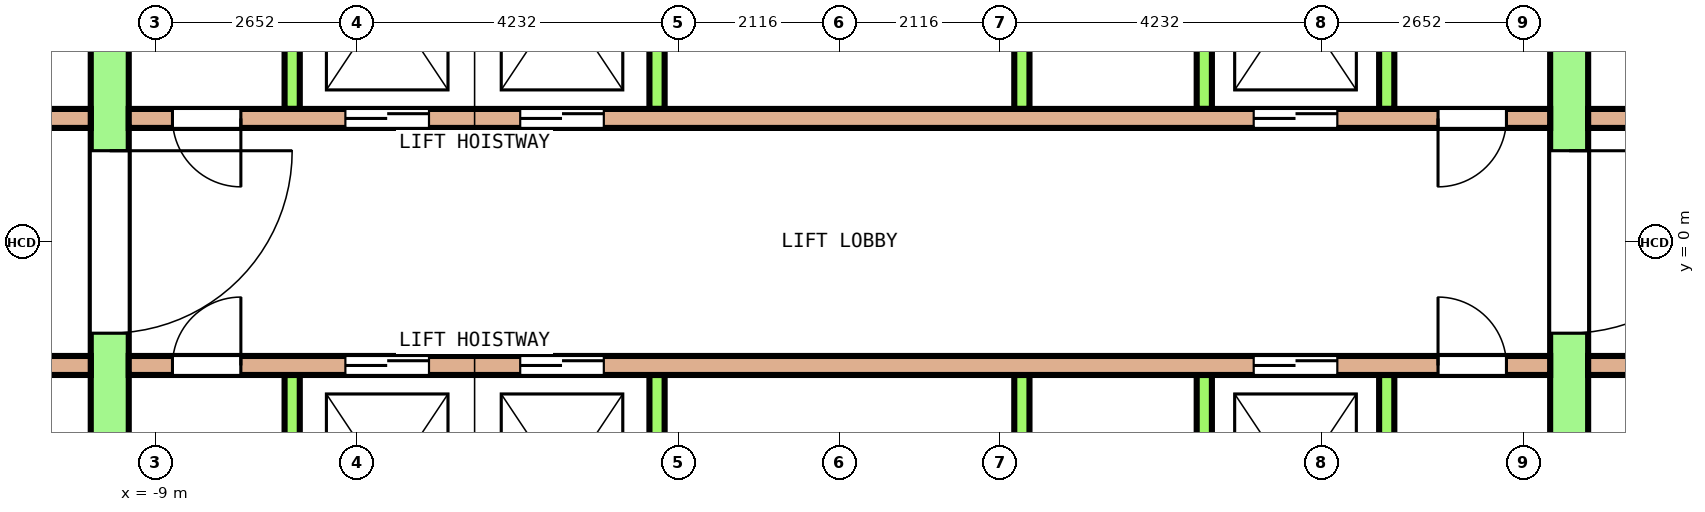
"""IFC4 building model, lengths in metres.
Left out: names, types, materials, properties, quantities, classifications, styles, units other than length and angle.
Written with IfcOpenShell. Run it as: python <this file> out.ifc"""

import sys

from ifc_helpers import new_model, si_unit, direction, frame, frame_2d, origin, place, context, subcontext, project, spatial, rectangle, extrude, element, fill, save


model = new_model("IFC4")
c1 = context("Model", 3, precision=1e-05, world=origin(), true_north=direction((0.0, 1.0)))
c2 = subcontext(c1, "Body", "Model", "MODEL_VIEW")
j1 = project(units=[si_unit("LENGTHUNIT", "METRE"), si_unit("PLANEANGLEUNIT", "RADIAN")], contexts=[c1])
p1 = place(None, origin())
s1 = spatial("IfcSite", under=j1, at=p1, CompositionType="ELEMENT")
p2 = place(p1, origin())
s2 = spatial("IfcBuilding", under=s1, at=p2, CompositionType="ELEMENT")
p3 = place(p2, frame((0.0, 0.0, 180.4)))
s3 = spatial("IfcBuildingStorey", under=s2, at=p3, CompositionType="ELEMENT", Elevation=180.4)
p4 = place(p3, frame((-9.6, -7.75, 0.0), z_axis=(0.0, 0.0, 1.0), x_axis=(0.0, 1.0, 0.0)))
e1 = element("IfcWall", 1, at=p4, inside=s3, PredefinedType="SHEAR", context=c2, shape_type="SweptSolid", body=[
    extrude(rectangle(XDim=15.5, YDim=0.5, at=frame_2d((7.75, 0.0))), origin(), (0.0, 0.0, 1.0), 4.1),
])
p5 = place(p4, frame((6.55, 0.0, 0.0)))
e2 = element("IfcOpeningElement", 2, at=p5, cuts=e1, PredefinedType="OPENING", context=c2, shape_type="SweptSolid", body=[
    extrude(rectangle(XDim=2.4, YDim=2.1, at=frame_2d((1.2, 1.05))), frame((0.0, 0.26, 0.0), z_axis=(0.0, -1.0, 0.0), x_axis=(1.0, 0.0, 0.0)), (0.0, 0.0, 1.0), 0.52),
])
p6 = place(p4, frame((13.45, 0.0, 0.0)))
e3 = element("IfcOpeningElement", 3, at=p6, cuts=e1, PredefinedType="OPENING", context=c2, shape_type="SweptSolid", body=[
    extrude(rectangle(XDim=1.2, YDim=2.1, at=frame_2d((0.6, 1.05))), frame((0.0, 0.26, 0.0), z_axis=(0.0, -1.0, 0.0), x_axis=(1.0, 0.0, 0.0)), (0.0, 0.0, 1.0), 0.52),
])
p7 = place(p4, frame((0.85, 0.0, 0.0)))
e4 = element("IfcOpeningElement", 4, at=p7, cuts=e1, PredefinedType="OPENING", context=c2, shape_type="SweptSolid", body=[
    extrude(rectangle(XDim=1.2, YDim=2.1, at=frame_2d((0.6, 1.05))), frame((0.0, 0.26, 0.0), z_axis=(0.0, -1.0, 0.0), x_axis=(1.0, 0.0, 0.0)), (0.0, 0.0, 1.0), 0.52),
])
p8 = place(p3, frame((9.6, -7.75, 0.0), z_axis=(0.0, 0.0, 1.0), x_axis=(0.0, 1.0, 0.0)))
e5 = element("IfcWall", 5, at=p8, inside=s3, PredefinedType="SHEAR", context=c2, shape_type="SweptSolid", body=[
    extrude(rectangle(XDim=15.5, YDim=0.5, at=frame_2d((7.75, 0.0))), origin(), (0.0, 0.0, 1.0), 4.1),
])
p9 = place(p8, frame((6.55, 0.0, 0.0)))
e6 = element("IfcOpeningElement", 6, at=p9, cuts=e5, PredefinedType="OPENING", context=c2, shape_type="SweptSolid", body=[
    extrude(rectangle(XDim=2.4, YDim=2.1, at=frame_2d((1.2, 1.05))), frame((0.0, 0.26, 0.0), z_axis=(0.0, -1.0, 0.0), x_axis=(1.0, 0.0, 0.0)), (0.0, 0.0, 1.0), 0.52),
])
p10 = place(p8, frame((13.45, 0.0, 0.0)))
e7 = element("IfcOpeningElement", 7, at=p10, cuts=e5, PredefinedType="OPENING", context=c2, shape_type="SweptSolid", body=[
    extrude(rectangle(XDim=1.2, YDim=2.1, at=frame_2d((0.6, 1.05))), frame((0.0, 0.26, 0.0), z_axis=(0.0, -1.0, 0.0), x_axis=(1.0, 0.0, 0.0)), (0.0, 0.0, 1.0), 0.52),
])
p11 = place(p8, frame((0.95, 0.0, 0.0)))
e8 = element("IfcOpeningElement", 8, at=p11, cuts=e5, PredefinedType="OPENING", context=c2, shape_type="SweptSolid", body=[
    extrude(rectangle(XDim=1.0, YDim=2.1, at=frame_2d((0.5, 1.05))), frame((0.0, 0.26, 0.0), z_axis=(0.0, -1.0, 0.0), x_axis=(1.0, 0.0, 0.0)), (0.0, 0.0, 1.0), 0.52),
])
p12 = place(p3, frame((-12.85, 1.625, 0.0), z_axis=(0.0, 0.0, 1.0), x_axis=(1.0, 0.0, 0.0)))
e9 = element("IfcWall", 9, at=p12, inside=s3, PredefinedType="SOLIDWALL", context=c2, shape_type="SweptSolid", body=[
    extrude(rectangle(XDim=3.0, YDim=0.25, at=frame_2d((1.5, 0.0))), origin(), (0.0, 0.0, 1.0), 4.1),
])
p13 = place(p12, frame((1.05, 0.0, 0.0)))
e10 = element("IfcOpeningElement", 10, at=p13, cuts=e9, PredefinedType="OPENING", context=c2, shape_type="SweptSolid", body=[
    extrude(rectangle(XDim=0.9, YDim=2.1, at=frame_2d((0.45, 1.05))), frame((0.0, 0.135, 0.0), z_axis=(0.0, -1.0, 0.0), x_axis=(1.0, 0.0, 0.0)), (0.0, 0.0, 1.0), 0.27),
])
p14 = place(p3, frame((-9.35, 1.625, 0.0), z_axis=(0.0, 0.0, 1.0), x_axis=(1.0, 0.0, 0.0)))
e11 = element("IfcWall", 11, at=p14, inside=s3, PredefinedType="SOLIDWALL", context=c2, shape_type="SweptSolid", body=[
    extrude(rectangle(XDim=18.7, YDim=0.25, at=frame_2d((9.35, 0.0))), origin(), (0.0, 0.0, 1.0), 4.1),
])
p15 = place(p14, frame((2.85, 0.0, 0.0)))
e12 = element("IfcOpeningElement", 12, at=p15, cuts=e11, PredefinedType="OPENING", context=c2, shape_type="SweptSolid", body=[
    extrude(rectangle(XDim=1.1, YDim=2.1, at=frame_2d((0.55, 1.05))), frame((0.0, 0.135, 0.0), z_axis=(0.0, -1.0, 0.0), x_axis=(1.0, 0.0, 0.0)), (0.0, 0.0, 1.0), 0.27),
])
p16 = place(p14, frame((5.15, 0.0, 0.0)))
e13 = element("IfcOpeningElement", 13, at=p16, cuts=e11, PredefinedType="OPENING", context=c2, shape_type="SweptSolid", body=[
    extrude(rectangle(XDim=1.1, YDim=2.1, at=frame_2d((0.55, 1.05))), frame((0.0, 0.135, 0.0), z_axis=(0.0, -1.0, 0.0), x_axis=(1.0, 0.0, 0.0)), (0.0, 0.0, 1.0), 0.27),
])
p17 = place(p14, frame((14.8, 0.0, 0.0)))
e14 = element("IfcOpeningElement", 14, at=p17, cuts=e11, PredefinedType="OPENING", context=c2, shape_type="SweptSolid", body=[
    extrude(rectangle(XDim=1.1, YDim=2.1, at=frame_2d((0.55, 1.05))), frame((0.0, 0.135, 0.0), z_axis=(0.0, -1.0, 0.0), x_axis=(1.0, 0.0, 0.0)), (0.0, 0.0, 1.0), 0.27),
])
p18 = place(p14, frame((0.575, 0.0, 0.0)))
e15 = element("IfcOpeningElement", 15, at=p18, cuts=e11, PredefinedType="OPENING", context=c2, shape_type="SweptSolid", body=[
    extrude(rectangle(XDim=0.9, YDim=2.1, at=frame_2d((0.45, 1.05))), frame((0.0, 0.135, 0.0), z_axis=(0.0, -1.0, 0.0), x_axis=(1.0, 0.0, 0.0)), (0.0, 0.0, 1.0), 0.27),
])
p19 = place(p14, frame((17.225, 0.0, 0.0)))
e16 = element("IfcOpeningElement", 16, at=p19, cuts=e11, PredefinedType="OPENING", context=c2, shape_type="SweptSolid", body=[
    extrude(rectangle(XDim=0.9, YDim=2.1, at=frame_2d((0.45, 1.05))), frame((0.0, 0.135, 0.0), z_axis=(0.0, -1.0, 0.0), x_axis=(1.0, 0.0, 0.0)), (0.0, 0.0, 1.0), 0.27),
])
p20 = place(p3, frame((9.85, 1.625, 0.0), z_axis=(0.0, 0.0, 1.0), x_axis=(1.0, 0.0, 0.0)))
e17 = element("IfcWall", 17, at=p20, inside=s3, PredefinedType="SOLIDWALL", context=c2, shape_type="SweptSolid", body=[
    extrude(rectangle(XDim=3.0, YDim=0.25, at=frame_2d((1.5, 0.0))), origin(), (0.0, 0.0, 1.0), 4.1),
])
p21 = place(p20, frame((1.05, 0.0, 0.0)))
e18 = element("IfcOpeningElement", 18, at=p21, cuts=e17, PredefinedType="OPENING", context=c2, shape_type="SweptSolid", body=[
    extrude(rectangle(XDim=0.9, YDim=2.1, at=frame_2d((0.45, 1.05))), frame((0.0, 0.135, 0.0), z_axis=(0.0, -1.0, 0.0), x_axis=(1.0, 0.0, 0.0)), (0.0, 0.0, 1.0), 0.27),
])
for number, where, z_axis, x_axis in (
    (19, (-7.2, 1.75, 0.0), (0.0, 0.0, 1.0), (0.0, 1.0, 0.0)),
    (20, (-2.4, 1.75, 0.0), (0.0, 0.0, 1.0), (0.0, 1.0, 0.0)),
    (21, (2.4, 1.75, 0.0), (0.0, 0.0, 1.0), (0.0, 1.0, 0.0)),
    (22, (4.8, 1.75, 0.0), (0.0, 0.0, 1.0), (0.0, 1.0, 0.0)),
    (23, (7.2, 1.75, 0.0), (0.0, 0.0, 1.0), (0.0, 1.0, 0.0)),
):
    element("IfcWall", number, at=place(p3, frame(where, z_axis=z_axis, x_axis=x_axis)), inside=s3, PredefinedType="SOLIDWALL", context=c2, shape_type="SweptSolid", body=[
        extrude(rectangle(XDim=2.9, YDim=0.2, at=frame_2d((1.45, 0.0))), origin(), (0.0, 0.0, 1.0), 4.1),
    ])
p22 = place(p3, frame((-12.85, -1.625, 0.0), z_axis=(0.0, 0.0, 1.0), x_axis=(1.0, 0.0, 0.0)))
e24 = element("IfcWall", 24, at=p22, inside=s3, PredefinedType="SOLIDWALL", context=c2, shape_type="SweptSolid", body=[
    extrude(rectangle(XDim=3.0, YDim=0.25, at=frame_2d((1.5, 0.0))), origin(), (0.0, 0.0, 1.0), 4.1),
])
p23 = place(p22, frame((1.05, 0.0, 0.0)))
e25 = element("IfcOpeningElement", 25, at=p23, cuts=e24, PredefinedType="OPENING", context=c2, shape_type="SweptSolid", body=[
    extrude(rectangle(XDim=0.9, YDim=2.1, at=frame_2d((0.45, 1.05))), frame((0.0, 0.135, 0.0), z_axis=(0.0, -1.0, 0.0), x_axis=(1.0, 0.0, 0.0)), (0.0, 0.0, 1.0), 0.27),
])
p24 = place(p3, frame((-9.35, -1.625, 0.0), z_axis=(0.0, 0.0, 1.0), x_axis=(1.0, 0.0, 0.0)))
e26 = element("IfcWall", 26, at=p24, inside=s3, PredefinedType="SOLIDWALL", context=c2, shape_type="SweptSolid", body=[
    extrude(rectangle(XDim=18.7, YDim=0.25, at=frame_2d((9.35, 0.0))), origin(), (0.0, 0.0, 1.0), 4.1),
])
p25 = place(p24, frame((2.85, 0.0, 0.0)))
e27 = element("IfcOpeningElement", 27, at=p25, cuts=e26, PredefinedType="OPENING", context=c2, shape_type="SweptSolid", body=[
    extrude(rectangle(XDim=1.1, YDim=2.1, at=frame_2d((0.55, 1.05))), frame((0.0, 0.135, 0.0), z_axis=(0.0, -1.0, 0.0), x_axis=(1.0, 0.0, 0.0)), (0.0, 0.0, 1.0), 0.27),
])
p26 = place(p24, frame((5.15, 0.0, 0.0)))
e28 = element("IfcOpeningElement", 28, at=p26, cuts=e26, PredefinedType="OPENING", context=c2, shape_type="SweptSolid", body=[
    extrude(rectangle(XDim=1.1, YDim=2.1, at=frame_2d((0.55, 1.05))), frame((0.0, 0.135, 0.0), z_axis=(0.0, -1.0, 0.0), x_axis=(1.0, 0.0, 0.0)), (0.0, 0.0, 1.0), 0.27),
])
p27 = place(p24, frame((14.8, 0.0, 0.0)))
e29 = element("IfcOpeningElement", 29, at=p27, cuts=e26, PredefinedType="OPENING", context=c2, shape_type="SweptSolid", body=[
    extrude(rectangle(XDim=1.1, YDim=2.1, at=frame_2d((0.55, 1.05))), frame((0.0, 0.135, 0.0), z_axis=(0.0, -1.0, 0.0), x_axis=(1.0, 0.0, 0.0)), (0.0, 0.0, 1.0), 0.27),
])
p28 = place(p24, frame((0.575, 0.0, 0.0)))
e30 = element("IfcOpeningElement", 30, at=p28, cuts=e26, PredefinedType="OPENING", context=c2, shape_type="SweptSolid", body=[
    extrude(rectangle(XDim=0.9, YDim=2.1, at=frame_2d((0.45, 1.05))), frame((0.0, 0.135, 0.0), z_axis=(0.0, -1.0, 0.0), x_axis=(1.0, 0.0, 0.0)), (0.0, 0.0, 1.0), 0.27),
])
p29 = place(p24, frame((17.225, 0.0, 0.0)))
e31 = element("IfcOpeningElement", 31, at=p29, cuts=e26, PredefinedType="OPENING", context=c2, shape_type="SweptSolid", body=[
    extrude(rectangle(XDim=0.9, YDim=2.1, at=frame_2d((0.45, 1.05))), frame((0.0, 0.135, 0.0), z_axis=(0.0, -1.0, 0.0), x_axis=(1.0, 0.0, 0.0)), (0.0, 0.0, 1.0), 0.27),
])
p30 = place(p3, frame((9.85, -1.625, 0.0), z_axis=(0.0, 0.0, 1.0), x_axis=(1.0, 0.0, 0.0)))
e32 = element("IfcWall", 32, at=p30, inside=s3, PredefinedType="SOLIDWALL", context=c2, shape_type="SweptSolid", body=[
    extrude(rectangle(XDim=3.0, YDim=0.25, at=frame_2d((1.5, 0.0))), origin(), (0.0, 0.0, 1.0), 4.1),
])
p31 = place(p30, frame((1.05, 0.0, 0.0)))
e33 = element("IfcOpeningElement", 33, at=p31, cuts=e32, PredefinedType="OPENING", context=c2, shape_type="SweptSolid", body=[
    extrude(rectangle(XDim=0.9, YDim=2.1, at=frame_2d((0.45, 1.05))), frame((0.0, 0.135, 0.0), z_axis=(0.0, -1.0, 0.0), x_axis=(1.0, 0.0, 0.0)), (0.0, 0.0, 1.0), 0.27),
])
for number, where, z_axis, x_axis in (
    (34, (-7.2, -4.65, 0.0), (0.0, 0.0, 1.0), (0.0, 1.0, 0.0)),
    (35, (-2.4, -4.65, 0.0), (0.0, 0.0, 1.0), (0.0, 1.0, 0.0)),
    (36, (2.4, -4.65, 0.0), (0.0, 0.0, 1.0), (0.0, 1.0, 0.0)),
    (37, (4.8, -4.65, 0.0), (0.0, 0.0, 1.0), (0.0, 1.0, 0.0)),
    (38, (7.2, -4.65, 0.0), (0.0, 0.0, 1.0), (0.0, 1.0, 0.0)),
):
    element("IfcWall", number, at=place(p3, frame(where, z_axis=z_axis, x_axis=x_axis)), inside=s3, PredefinedType="SOLIDWALL", context=c2, shape_type="SweptSolid", body=[
        extrude(rectangle(XDim=2.9, YDim=0.2, at=frame_2d((1.45, 0.0))), origin(), (0.0, 0.0, 1.0), 4.1),
    ])
p32 = place(p15, origin())
e39 = element("IfcDoor", 39, at=p32, inside=s3, OperationType="DOUBLE_DOOR_SLIDING", PredefinedType="DOOR", context=c2, shape_type="SweptSolid", body=[
    extrude(rectangle(XDim=1.1, YDim=2.1, at=frame_2d((0.55, 1.05))), frame((0.0, 0.075, 0.0), z_axis=(0.0, -1.0, 0.0), x_axis=(1.0, 0.0, 0.0)), (0.0, 0.0, 1.0), 0.15),
])
fill(e12, e39)
p33 = place(p16, origin())
e40 = element("IfcDoor", 40, at=p33, inside=s3, OperationType="DOUBLE_DOOR_SLIDING", PredefinedType="DOOR", context=c2, shape_type="SweptSolid", body=[
    extrude(rectangle(XDim=1.1, YDim=2.1, at=frame_2d((0.55, 1.05))), frame((0.0, 0.075, 0.0), z_axis=(0.0, -1.0, 0.0), x_axis=(1.0, 0.0, 0.0)), (0.0, 0.0, 1.0), 0.15),
])
fill(e13, e40)
p34 = place(p17, origin())
e41 = element("IfcDoor", 41, at=p34, inside=s3, OperationType="DOUBLE_DOOR_SLIDING", PredefinedType="DOOR", context=c2, shape_type="SweptSolid", body=[
    extrude(rectangle(XDim=1.1, YDim=2.1, at=frame_2d((0.55, 1.05))), frame((0.0, 0.075, 0.0), z_axis=(0.0, -1.0, 0.0), x_axis=(1.0, 0.0, 0.0)), (0.0, 0.0, 1.0), 0.15),
])
fill(e14, e41)
p35 = place(p25, origin())
e42 = element("IfcDoor", 42, at=p35, inside=s3, OperationType="DOUBLE_DOOR_SLIDING", PredefinedType="DOOR", context=c2, shape_type="SweptSolid", body=[
    extrude(rectangle(XDim=1.1, YDim=2.1, at=frame_2d((0.55, 1.05))), frame((0.0, 0.075, 0.0), z_axis=(0.0, -1.0, 0.0), x_axis=(1.0, 0.0, 0.0)), (0.0, 0.0, 1.0), 0.15),
])
fill(e27, e42)
p36 = place(p26, origin())
e43 = element("IfcDoor", 43, at=p36, inside=s3, OperationType="DOUBLE_DOOR_SLIDING", PredefinedType="DOOR", context=c2, shape_type="SweptSolid", body=[
    extrude(rectangle(XDim=1.1, YDim=2.1, at=frame_2d((0.55, 1.05))), frame((0.0, 0.075, 0.0), z_axis=(0.0, -1.0, 0.0), x_axis=(1.0, 0.0, 0.0)), (0.0, 0.0, 1.0), 0.15),
])
fill(e28, e43)
p37 = place(p27, origin())
e44 = element("IfcDoor", 44, at=p37, inside=s3, OperationType="DOUBLE_DOOR_SLIDING", PredefinedType="DOOR", context=c2, shape_type="SweptSolid", body=[
    extrude(rectangle(XDim=1.1, YDim=2.1, at=frame_2d((0.55, 1.05))), frame((0.0, 0.075, 0.0), z_axis=(0.0, -1.0, 0.0), x_axis=(1.0, 0.0, 0.0)), (0.0, 0.0, 1.0), 0.15),
])
fill(e29, e44)
p38 = place(p5, origin())
e45 = element("IfcDoor", 45, at=p38, inside=s3, OperationType="DOUBLE_DOOR_SINGLE_SWING", PredefinedType="DOOR", context=c2, shape_type="SweptSolid", body=[
    extrude(rectangle(XDim=2.4, YDim=2.1, at=frame_2d((1.2, 1.05))), frame((0.0, 0.2, 0.0), z_axis=(0.0, -1.0, 0.0), x_axis=(1.0, 0.0, 0.0)), (0.0, 0.0, 1.0), 0.4),
])
fill(e2, e45)
p39 = place(p9, origin())
e46 = element("IfcDoor", 46, at=p39, inside=s3, OperationType="DOUBLE_DOOR_SINGLE_SWING", PredefinedType="DOOR", context=c2, shape_type="SweptSolid", body=[
    extrude(rectangle(XDim=2.4, YDim=2.1, at=frame_2d((1.2, 1.05))), frame((0.0, 0.2, 0.0), z_axis=(0.0, -1.0, 0.0), x_axis=(1.0, 0.0, 0.0)), (0.0, 0.0, 1.0), 0.4),
])
fill(e6, e46)
p40 = place(p18, origin())
e47 = element("IfcDoor", 47, at=p40, inside=s3, OperationType="SINGLE_SWING_RIGHT", PredefinedType="DOOR", context=c2, shape_type="SweptSolid", body=[
    extrude(rectangle(XDim=0.9, YDim=2.1, at=frame_2d((0.45, 1.05))), frame((0.0, 0.075, 0.0), z_axis=(0.0, -1.0, 0.0), x_axis=(1.0, 0.0, 0.0)), (0.0, 0.0, 1.0), 0.15),
])
fill(e15, e47)
p41 = place(p19, origin())
e48 = element("IfcDoor", 48, at=p41, inside=s3, OperationType="SINGLE_SWING_LEFT", PredefinedType="DOOR", context=c2, shape_type="SweptSolid", body=[
    extrude(rectangle(XDim=0.9, YDim=2.1, at=frame_2d((0.45, 1.05))), frame((0.0, 0.075, 0.0), z_axis=(0.0, -1.0, 0.0), x_axis=(1.0, 0.0, 0.0)), (0.0, 0.0, 1.0), 0.15),
])
fill(e16, e48)
p42 = place(p28, origin())
e49 = element("IfcDoor", 49, at=p42, inside=s3, OperationType="SINGLE_SWING_RIGHT", PredefinedType="DOOR", context=c2, shape_type="SweptSolid", body=[
    extrude(rectangle(XDim=0.9, YDim=2.1, at=frame_2d((0.45, 1.05))), frame((0.0, 0.075, 0.0), z_axis=(0.0, -1.0, 0.0), x_axis=(1.0, 0.0, 0.0)), (0.0, 0.0, 1.0), 0.15),
])
fill(e30, e49)
p43 = place(p29, origin())
e50 = element("IfcDoor", 50, at=p43, inside=s3, OperationType="SINGLE_SWING_LEFT", PredefinedType="DOOR", context=c2, shape_type="SweptSolid", body=[
    extrude(rectangle(XDim=0.9, YDim=2.1, at=frame_2d((0.45, 1.05))), frame((0.0, 0.075, 0.0), z_axis=(0.0, -1.0, 0.0), x_axis=(1.0, 0.0, 0.0)), (0.0, 0.0, 1.0), 0.15),
])
fill(e31, e50)
save(model, sys.argv[1])
